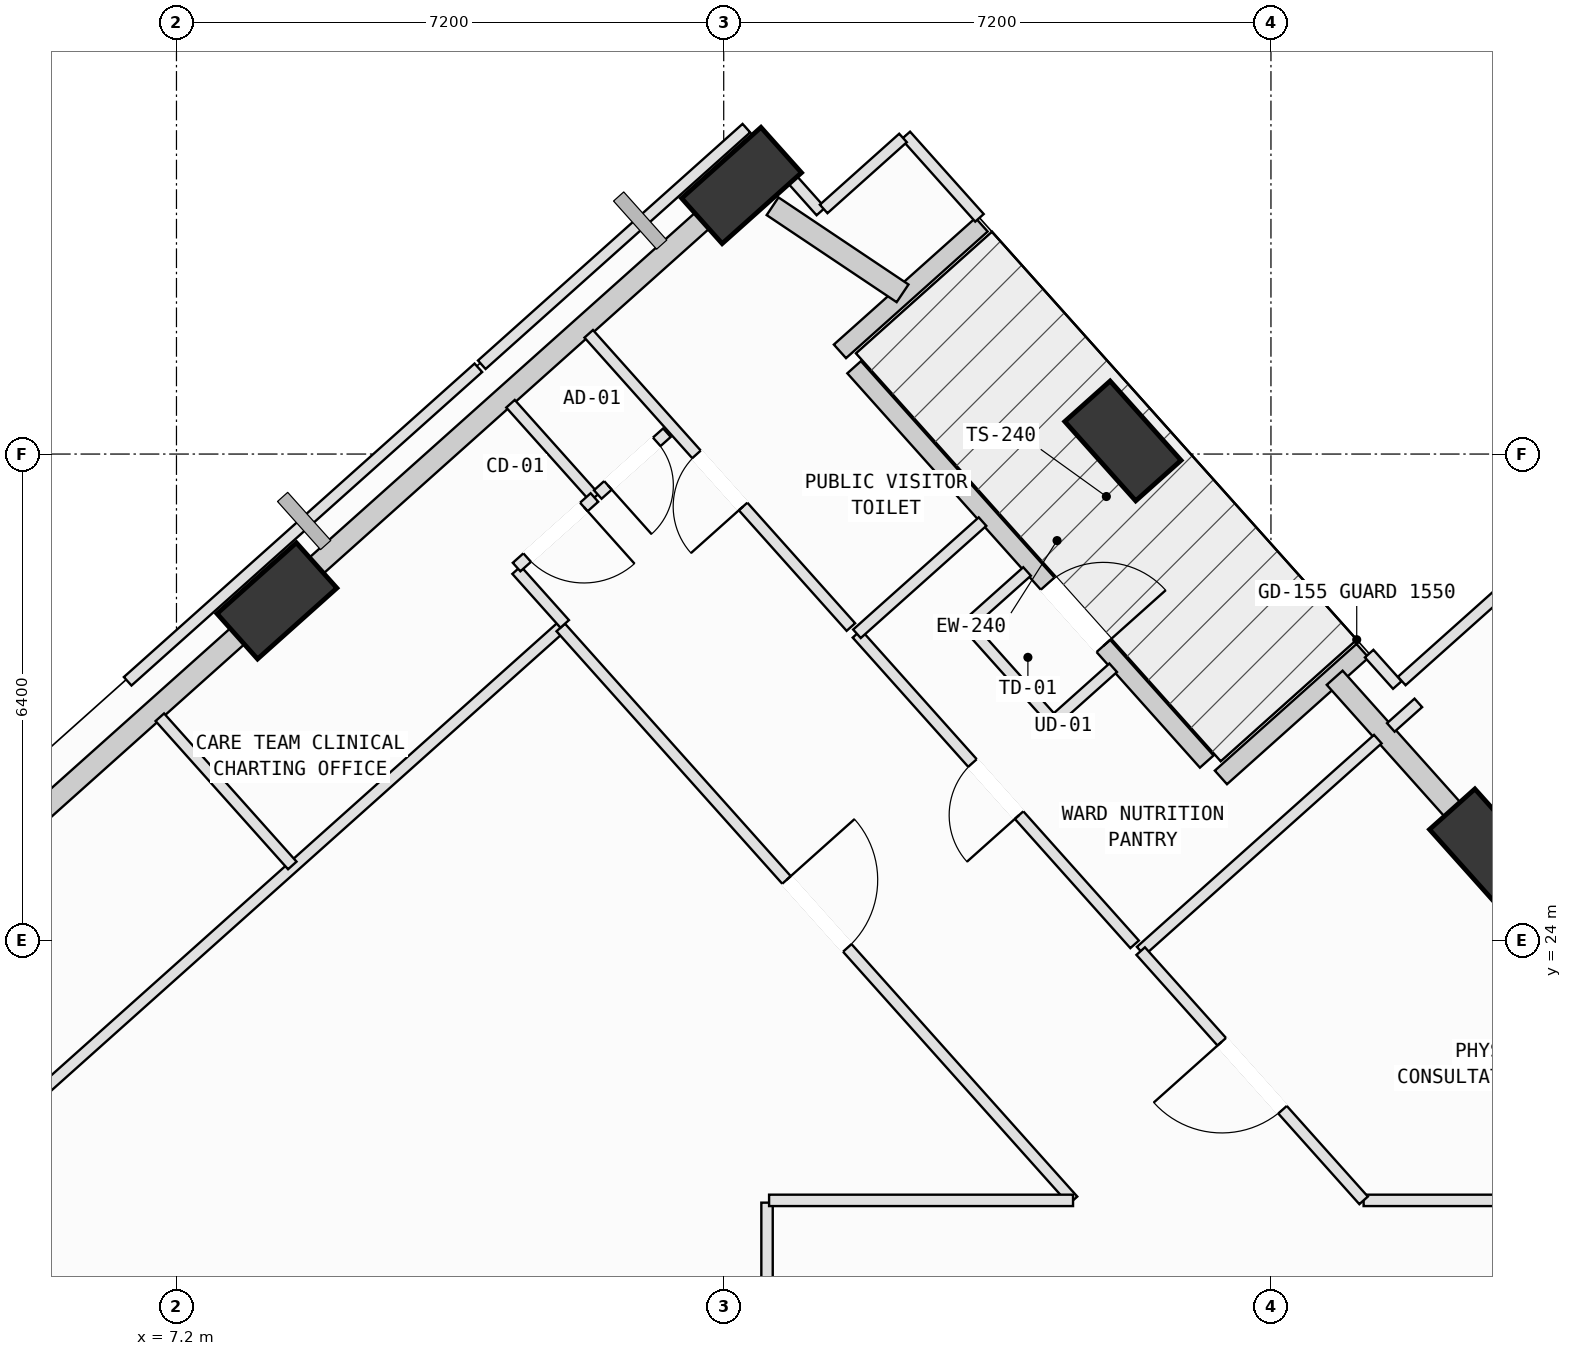
"""IFC4 building model, lengths in metres.
Left out: names, types, materials, properties, quantities, classifications, styles, units other than length and angle.
Written with IfcOpenShell. Run it as: python <this file> out.ifc"""

import sys

from ifc_helpers import new_model, si_unit, direction, frame, frame_2d, origin, origin_2d, place, context, subcontext, project, spatial, rectangle, extrude, element, fill, save


model = new_model("IFC4")
c1 = context("Model", 3, precision=1e-05, world=origin(), true_north=direction((0.0, 1.0)))
c2 = subcontext(c1, "Body", "Model", "MODEL_VIEW")
j1 = project(units=[si_unit("LENGTHUNIT", "METRE"), si_unit("PLANEANGLEUNIT", "RADIAN")], contexts=[c1])
p1 = place(None, origin())
s1 = spatial("IfcSite", under=j1, at=p1, CompositionType="ELEMENT")
p2 = place(p1, origin())
s2 = spatial("IfcBuilding", under=s1, at=p2, CompositionType="ELEMENT")
p3 = place(p2, frame((0.0, 0.0, 201.8)))
s3 = spatial("IfcBuildingStorey", under=s2, at=p3, CompositionType="ELEMENT", Elevation=201.8)
p4 = place(p3, frame((24.451, 25.205, 0.002), z_axis=(-0.001414889016, -0.037894418868, 0.999280746891), x_axis=(-0.63827340517, 0.769290530465, 0.028269064174)))
e1 = element("IfcColumn", 1, at=p4, inside=s3, PredefinedType="COLUMN", context=c2, shape_type="SweptSolid", body=[
    extrude(rectangle(XDim=1.4, YDim=0.8, at=origin_2d()), origin(), (0.0, 0.0, 1.0), 3.969),
])
p5 = place(p3, frame((19.652, 30.573, 0.002), z_axis=(-0.023400018173, -0.057851759968, 0.998050907027), x_axis=(-0.338913817556, 0.939666525529, 0.046521447421)))
e2 = element("IfcColumn", 2, at=p5, inside=s3, PredefinedType="COLUMN", context=c2, shape_type="SweptSolid", body=[
    extrude(rectangle(XDim=1.4, YDim=0.8, at=origin_2d()), origin(), (0.0, 0.0, 1.0), 3.954),
])
p6 = place(p3, frame((14.635, 33.934, 0.002), z_axis=(-0.037077983422, -0.078612752832, 0.996215467777), x_axis=(0.957500793087, 0.282552508139, 0.057933680899)))
e3 = element("IfcColumn", 3, at=p6, inside=s3, PredefinedType="COLUMN", context=c2, shape_type="SweptSolid", body=[
    extrude(rectangle(XDim=1.4, YDim=0.8, at=origin_2d()), origin(), (0.0, 0.0, 1.0), 3.944),
])
p7 = place(p3, frame((8.522, 28.468, 0.002), z_axis=(-0.014261490133, -0.103550819662, 0.994521914111), x_axis=(0.828946191978, 0.554972155566, 0.069671495975)))
e4 = element("IfcColumn", 4, at=p7, inside=s3, PredefinedType="COLUMN", context=c2, shape_type="SweptSolid", body=[
    extrude(rectangle(XDim=1.4, YDim=0.8, at=origin_2d()), origin(), (0.0, 0.0, 1.0), 3.937),
])
p8 = place(p3, frame((16.116, 31.542, 0.0), z_axis=(0.0, 0.0, 1.0), x_axis=(0.666505663581, -0.745499966743, 0.0)))
e5 = element("IfcWall", 5, at=p8, inside=s3, PredefinedType="SOLIDWALL", context=c2, shape_type="SweptSolid", body=[
    extrude(rectangle(XDim=6.96, YDim=0.24, at=frame_2d((3.48, 0.0))), origin(), (0.0, 0.0, 1.0), 3.185),
])
p9 = place(p8, frame((3.82, 0.0, 0.0)))
e6 = element("IfcOpeningElement", 6, at=p9, cuts=e5, PredefinedType="OPENING", context=c2, shape_type="SweptSolid", body=[
    extrude(rectangle(XDim=1.1, YDim=2.15, at=frame_2d((0.55, 1.075))), frame((0.0, 0.13, 0.0), z_axis=(0.0, -1.0, 0.0), x_axis=(1.0, 0.0, 0.0)), (0.0, 0.0, 1.0), 0.26),
])
for number, where, z_axis, x_axis in (
    (7, (20.942, 26.145, 0.0), (0.0, 0.0, 1.0), (0.746, 0.667, 0.0)),
    (8, (17.793, 33.417, 0.0), (0.0, 0.0, 1.0), (-0.746, -0.667, 0.0)),
):
    element("IfcWall", number, at=place(p3, frame(where, z_axis=z_axis, x_axis=x_axis)), inside=s3, PredefinedType="SOLIDWALL", context=c2, shape_type="SweptSolid", body=[
        extrude(rectangle(XDim=2.5, YDim=0.24, at=frame_2d((1.25, 0.0))), origin(), (0.0, 0.0, 1.0), 3.185),
    ])
p10 = place(p3, frame((24.159, 25.532, 0.0), z_axis=(0.0, 0.0, 1.0), x_axis=(-0.666515579079, 0.745491101788, 0.0)))
e9 = element("IfcWall", 9, at=p10, inside=s3, PredefinedType="SOLIDWALL", context=c2, shape_type="SweptSolid", body=[
    extrude(rectangle(XDim=2.581, YDim=0.28, at=frame_2d((1.291, 0.0))), origin(), (0.0, 0.0, 1.0), 3.185),
])
p11 = place(p3, frame((15.043, 33.66, 0.0), z_axis=(0.0, 0.0, 1.0), x_axis=(0.830825907851, -0.556532398736, 0.0)))
e10 = element("IfcWall", 10, at=p11, inside=s3, PredefinedType="SOLIDWALL", context=c2, shape_type="SweptSolid", body=[
    extrude(rectangle(XDim=2.059, YDim=0.28, at=frame_2d((1.029, 0.0))), origin(), (0.0, 0.0, 1.0), 3.185),
])
p12 = place(p3, frame((8.758, 28.68, 0.0), z_axis=(0.0, 0.0, 1.0), x_axis=(0.745474395111, 0.666534264862, 0.0)))
e11 = element("IfcWall", 11, at=p12, inside=s3, PredefinedType="SOLIDWALL", context=c2, shape_type="SweptSolid", body=[
    extrude(rectangle(XDim=7.231, YDim=0.28, at=frame_2d((3.615, 0.0))), origin(), (0.0, 0.0, 1.0), 3.185),
])
p13 = place(p3, frame((2.627, 23.198, 0.0), z_axis=(0.0, 0.0, 1.0), x_axis=(0.745479282524, 0.666528798573, 0.0)))
e12 = element("IfcWall", 12, at=p13, inside=s3, PredefinedType="SOLIDWALL", context=c2, shape_type="SweptSolid", body=[
    extrude(rectangle(XDim=7.27, YDim=0.28, at=frame_2d((3.635, 0.0))), origin(), (0.0, 0.0, 1.0), 3.185),
])
p14 = place(p3, frame((14.97, 20.55, 0.0), z_axis=(0.0, 0.0, 1.0), x_axis=(0.0, -1.0, 0.0)))
e13 = element("IfcWall", 13, at=p14, inside=s3, PredefinedType="PARTITIONING", context=c2, shape_type="SweptSolid", body=[
    extrude(rectangle(XDim=2.32, YDim=0.15, at=frame_2d((1.16, 0.0))), origin(), (0.0, 0.0, 1.0), 3.7),
])
p15 = place(p3, frame((2.9, 19.753, 0.0), z_axis=(0.0, 0.0, 1.0), x_axis=(0.745492591752, 0.666513912565, 0.0)))
e14 = element("IfcWall", 14, at=p15, inside=s3, PredefinedType="PARTITIONING", context=c2, shape_type="SweptSolid", body=[
    extrude(rectangle(XDim=12.55, YDim=0.15, at=frame_2d((6.275, 0.0))), origin(), (0.0, 0.0, 1.0), 3.7),
])
p16 = place(p3, frame((12.256, 28.118, 0.0), z_axis=(0.0, 0.0, 1.0), x_axis=(0.666553455148, -0.745457236487, 0.0)))
e15 = element("IfcWall", 15, at=p16, inside=s3, PredefinedType="PARTITIONING", context=c2, shape_type="SweptSolid", body=[
    extrude(rectangle(XDim=10.112, YDim=0.15, at=frame_2d((5.056, 0.0))), origin(), (0.0, 0.0, 1.0), 3.7),
])
p17 = place(p16, frame((4.456, 0.0, 0.0)))
e16 = element("IfcOpeningElement", 16, at=p17, cuts=e15, PredefinedType="OPENING", context=c2, shape_type="SweptSolid", body=[
    extrude(rectangle(XDim=1.2, YDim=2.15, at=frame_2d((0.6, 1.075))), frame((0.0, 0.085, 0.0), z_axis=(0.0, -1.0, 0.0), x_axis=(1.0, 0.0, 0.0)), (0.0, 0.0, 1.0), 0.17),
])
p18 = place(p3, frame((18.996, 20.58, 0.0), z_axis=(0.0, 0.0, 1.0), x_axis=(-1.0, 0.0, 0.0)))
e17 = element("IfcWall", 17, at=p18, inside=s3, PredefinedType="PARTITIONING", context=c2, shape_type="SweptSolid", body=[
    extrude(rectangle(XDim=3.999, YDim=0.15, at=frame_2d((2.0, 0.0))), origin(), (0.0, 0.0, 1.0), 3.7),
])
p19 = place(p3, frame((19.886, 23.86, 0.0), z_axis=(0.0, 0.0, 1.0), x_axis=(0.745581471628, 0.666414487512, 0.0)))
e18 = element("IfcWall", 18, at=p19, inside=s3, PredefinedType="PARTITIONING", context=c2, shape_type="SweptSolid", body=[
    extrude(rectangle(XDim=4.185, YDim=0.15, at=frame_2d((2.092, 0.0))), origin(), (0.0, 0.0, 1.0), 3.7),
])
p20 = place(p3, frame((23.177, 26.803, 0.0), z_axis=(0.0, 0.0, 1.0), x_axis=(0.746214363491, 0.665705733579, 0.0)))
e19 = element("IfcWall", 19, at=p20, inside=s3, PredefinedType="PARTITIONING", context=c2, shape_type="SweptSolid", body=[
    extrude(rectangle(XDim=0.485, YDim=0.15, at=frame_2d((0.243, 0.0))), origin(), (0.0, 0.0, 1.0), 3.7),
])
p21 = place(p3, frame((25.49, 20.58, 0.0), z_axis=(0.0, 0.0, 1.0), x_axis=(-1.0, 0.0, 0.0)))
e20 = element("IfcWall", 20, at=p21, inside=s3, PredefinedType="PARTITIONING", context=c2, shape_type="SweptSolid", body=[
    extrude(rectangle(XDim=2.671, YDim=0.15, at=frame_2d((1.335, 0.0))), origin(), (0.0, 0.0, 1.0), 3.7),
])
p22 = place(p3, frame((22.819, 20.58, 0.0), z_axis=(0.0, 0.0, 1.0), x_axis=(-0.66658561557, 0.745428478873, 0.0)))
e21 = element("IfcWall", 21, at=p22, inside=s3, PredefinedType="PARTITIONING", context=c2, shape_type="SweptSolid", body=[
    extrude(rectangle(XDim=4.4, YDim=0.15, at=frame_2d((2.2, 0.0))), origin(), (0.0, 0.0, 1.0), 3.7),
])
p23 = place(p22, frame((1.6, 0.0, 0.0)))
e22 = element("IfcOpeningElement", 22, at=p23, cuts=e21, PredefinedType="OPENING", context=c2, shape_type="SweptSolid", body=[
    extrude(rectangle(XDim=1.2, YDim=2.15, at=frame_2d((0.6, 1.075))), frame((0.0, 0.085, 0.0), z_axis=(0.0, -1.0, 0.0), x_axis=(1.0, 0.0, 0.0)), (0.0, 0.0, 1.0), 0.17),
])
p24 = place(p3, frame((19.806, 23.949, 0.0), z_axis=(0.0, 0.0, 1.0), x_axis=(-0.666490112364, 0.745513869838, 0.0)))
e23 = element("IfcWall", 23, at=p24, inside=s3, PredefinedType="PARTITIONING", context=c2, shape_type="SweptSolid", body=[
    extrude(rectangle(XDim=5.481, YDim=0.15, at=frame_2d((2.74, 0.0))), origin(), (0.0, 0.0, 1.0), 3.7),
])
p25 = place(p24, frame((2.281, 0.0, 0.0)))
e24 = element("IfcOpeningElement", 24, at=p25, cuts=e23, PredefinedType="OPENING", context=c2, shape_type="SweptSolid", body=[
    extrude(rectangle(XDim=0.92, YDim=2.1, at=frame_2d((0.46, 1.05))), frame((0.0, 0.085, 0.0), z_axis=(0.0, -1.0, 0.0), x_axis=(1.0, 0.0, 0.0)), (0.0, 0.0, 1.0), 0.17),
])
p26 = place(p3, frame((16.153, 28.035, 0.0), z_axis=(0.0, 0.0, 1.0), x_axis=(0.745667750991, 0.666317945978, 0.0)))
e25 = element("IfcWall", 25, at=p26, inside=s3, PredefinedType="PARTITIONING", context=c2, shape_type="SweptSolid", body=[
    extrude(rectangle(XDim=2.215, YDim=0.15, at=frame_2d((1.108, 0.0))), origin(), (0.0, 0.0, 1.0), 3.7),
])
p27 = place(p3, frame((18.391, 28.855, 0.0), z_axis=(0.0, 0.0, 1.0), x_axis=(-0.74588840019, -0.666070938011, 0.0)))
e26 = element("IfcWall", 26, at=p27, inside=s3, PredefinedType="PARTITIONING", context=c2, shape_type="SweptSolid", body=[
    extrude(rectangle(XDim=1.055, YDim=0.15, at=frame_2d((0.528, 0.0))), origin(), (0.0, 0.0, 1.0), 3.7),
])
p28 = place(p3, frame((17.604, 28.152, 0.0), z_axis=(0.0, 0.0, 1.0), x_axis=(0.666899772094, -0.745147431037, 0.0)))
e27 = element("IfcWall", 27, at=p28, inside=s3, PredefinedType="PARTITIONING", context=c2, shape_type="SweptSolid", body=[
    extrude(rectangle(XDim=1.7, YDim=0.15, at=frame_2d((0.85, 0.0))), origin(), (0.0, 0.0, 1.0), 3.7),
])
p29 = place(p3, frame((18.738, 26.885, 0.0), z_axis=(0.0, 0.0, 1.0), x_axis=(0.745374531652, 0.666645938685, 0.0)))
e28 = element("IfcWall", 28, at=p29, inside=s3, PredefinedType="PARTITIONING", context=c2, shape_type="SweptSolid", body=[
    extrude(rectangle(XDim=1.054, YDim=0.15, at=frame_2d((0.527, 0.0))), origin(), (0.0, 0.0, 1.0), 3.7),
])
p30 = place(p3, frame((22.892, 27.774, 0.0), z_axis=(0.0, 0.0, 1.0), x_axis=(0.667283955709, -0.74480341195, 0.0)))
e29 = element("IfcWall", 29, at=p30, inside=s3, PredefinedType="PARTITIONING", context=c2, shape_type="SweptSolid", body=[
    extrude(rectangle(XDim=0.554, YDim=0.15, at=frame_2d((0.277, 0.0))), origin(), (0.0, 0.0, 1.0), 3.7),
])
p31 = place(p3, frame((16.796, 34.592, 0.0), z_axis=(0.0, 0.0, 1.0), x_axis=(0.666456118224, -0.745544259238, 0.0)))
e30 = element("IfcWall", 30, at=p31, inside=s3, PredefinedType="PARTITIONING", context=c2, shape_type="SweptSolid", body=[
    extrude(rectangle(XDim=1.454, YDim=0.15, at=frame_2d((0.727, 0.0))), origin(), (0.0, 0.0, 1.0), 3.7),
])
p32 = place(p3, frame((16.073, 28.124, 0.0), z_axis=(0.0, 0.0, 1.0), x_axis=(-0.666490030892, 0.745513942674, 0.0)))
e31 = element("IfcWall", 31, at=p32, inside=s3, PredefinedType="PARTITIONING", context=c2, shape_type="SweptSolid", body=[
    extrude(rectangle(XDim=5.175, YDim=0.15, at=frame_2d((2.587, 0.0))), origin(), (0.0, 0.0, 1.0), 3.7),
])
p33 = place(p32, frame((2.127, 0.0, 0.0)))
e32 = element("IfcOpeningElement", 32, at=p33, cuts=e31, PredefinedType="OPENING", context=c2, shape_type="SweptSolid", body=[
    extrude(rectangle(XDim=0.92, YDim=2.1, at=frame_2d((0.46, 1.05))), frame((0.0, 0.085, 0.0), z_axis=(0.0, -1.0, 0.0), x_axis=(1.0, 0.0, 0.0)), (0.0, 0.0, 1.0), 0.17),
])
p34 = place(p3, frame((14.022, 33.641, 0.0), z_axis=(0.0, 0.0, 1.0), x_axis=(0.745613144613, 0.666379050226, 0.0)))
e33 = element("IfcWall", 33, at=p34, inside=s3, PredefinedType="PARTITIONING", context=c2, shape_type="SweptSolid", body=[
    extrude(rectangle(XDim=1.202, YDim=0.15, at=frame_2d((0.601, 0.0))), origin(), (0.0, 0.0, 1.0), 3.185),
])
p35 = place(p3, frame((14.951, 34.405, 0.0), z_axis=(0.0, 0.0, 1.0), x_axis=(0.666611630462, -0.745405214721, 0.0)))
e34 = element("IfcWall", 34, at=p35, inside=s3, PredefinedType="PARTITIONING", context=c2, shape_type="SweptSolid", body=[
    extrude(rectangle(XDim=1.091, YDim=0.15, at=frame_2d((0.545, 0.0))), origin(), (0.0, 0.0, 1.0), 3.7),
])
p36 = place(p3, frame((15.715, 33.625, 0.0), z_axis=(0.0, 0.0, 1.0), x_axis=(0.745232197137, 0.666805048234, 0.0)))
e35 = element("IfcWall", 35, at=p36, inside=s3, PredefinedType="PARTITIONING", context=c2, shape_type="SweptSolid", body=[
    extrude(rectangle(XDim=1.401, YDim=0.15, at=frame_2d((0.7, 0.0))), origin(), (0.0, 0.0, 1.0), 3.7),
])
p37 = place(p3, frame((11.675, 28.873, 0.0), z_axis=(0.0, 0.0, 1.0), x_axis=(0.666546862145, -0.745463131593, 0.0)))
e36 = element("IfcWall", 36, at=p37, inside=s3, PredefinedType="PARTITIONING", context=c2, shape_type="SweptSolid", body=[
    extrude(rectangle(XDim=0.95, YDim=0.15, at=frame_2d((0.475, 0.0))), origin(), (0.0, 0.0, 1.0), 3.7),
])
p38 = place(p3, frame((8.724, 24.987, 0.0), z_axis=(0.0, 0.0, 1.0), x_axis=(-0.66647010562, 0.745531755404, 0.0)))
e37 = element("IfcWall", 37, at=p38, inside=s3, PredefinedType="PARTITIONING", context=c2, shape_type="SweptSolid", body=[
    extrude(rectangle(XDim=2.615, YDim=0.15, at=frame_2d((1.308, 0.0))), origin(), (0.0, 0.0, 1.0), 3.7),
])
p39 = place(p3, frame((6.558, 27.41, 0.0), z_axis=(0.0, 0.0, 1.0), x_axis=(0.745508461456, 0.666496161953, 0.0)))
e38 = element("IfcWall", 38, at=p39, inside=s3, PredefinedType="PARTITIONING", context=c2, shape_type="SweptSolid", body=[
    extrude(rectangle(XDim=6.189, YDim=0.15, at=frame_2d((3.094, 0.0))), origin(), (0.0, 0.0, 1.0), 3.7),
])
p40 = place(p3, frame((11.595, 31.062, 0.0), z_axis=(0.0, 0.0, 1.0), x_axis=(0.666721590139, -0.74530686381, 0.0)))
e39 = element("IfcWall", 39, at=p40, inside=s3, PredefinedType="PARTITIONING", context=c2, shape_type="SweptSolid", body=[
    extrude(rectangle(XDim=1.656, YDim=0.15, at=frame_2d((0.828, 0.0))), origin(), (0.0, 0.0, 1.0), 3.7),
])
p41 = place(p3, frame((12.699, 29.828, 0.0), z_axis=(0.0, 0.0, 1.0), x_axis=(-0.745729403565, -0.666248944959, 0.0)))
e40 = element("IfcWall", 40, at=p41, inside=s3, PredefinedType="PARTITIONING", context=c2, shape_type="SweptSolid", body=[
    extrude(rectangle(XDim=1.373, YDim=0.15, at=frame_2d((0.687, 0.0))), origin(), (0.0, 0.0, 1.0), 3.7),
])
p42 = place(p41, frame((0.187, 0.0, 0.0)))
e41 = element("IfcOpeningElement", 41, at=p42, cuts=e40, PredefinedType="OPENING", context=c2, shape_type="SweptSolid", body=[
    extrude(rectangle(XDim=1.0, YDim=2.12, at=frame_2d((0.5, 1.06))), frame((0.0, 0.085, 0.0), z_axis=(0.0, -1.0, 0.0), x_axis=(1.0, 0.0, 0.0)), (0.0, 0.0, 1.0), 0.17),
])
p43 = place(p3, frame((13.653, 30.681, 0.0), z_axis=(0.0, 0.0, 1.0), x_axis=(-0.745795662785, -0.666174773893, 0.0)))
e42 = element("IfcWall", 42, at=p43, inside=s3, PredefinedType="PARTITIONING", context=c2, shape_type="SweptSolid", body=[
    extrude(rectangle(XDim=1.22, YDim=0.15, at=frame_2d((0.61, 0.0))), origin(), (0.0, 0.0, 1.0), 3.7),
])
p44 = place(p43, frame((0.18, 0.0, 0.0)))
e43 = element("IfcOpeningElement", 43, at=p44, cuts=e42, PredefinedType="OPENING", context=c2, shape_type="SweptSolid", body=[
    extrude(rectangle(XDim=0.86, YDim=2.06, at=frame_2d((0.43, 1.03))), frame((0.0, 0.085, 0.0), z_axis=(0.0, -1.0, 0.0), x_axis=(1.0, 0.0, 0.0)), (0.0, 0.0, 1.0), 0.17),
])
p45 = place(p3, frame((11.217, 31.575, 0.0), z_axis=(0.0, 0.0, 1.0), x_axis=(0.745401267381, 0.666616044352, 0.0)))
e44 = element("IfcWall", 44, at=p45, inside=s3, PredefinedType="PARTITIONING", context=c2, shape_type="SweptSolid", body=[
    extrude(rectangle(XDim=4.67, YDim=0.15, at=frame_2d((2.335, 0.0))), origin(), (0.0, 0.0, 1.0), 3.7),
])
p46 = place(p3, frame((23.321, 27.414, 0.0), z_axis=(0.0, 0.0, 1.0), x_axis=(0.745659752228, 0.666326897181, 0.0)))
e45 = element("IfcWall", 45, at=p46, inside=s3, PredefinedType="PARTITIONING", context=c2, shape_type="SweptSolid", body=[
    extrude(rectangle(XDim=2.12, YDim=0.15, at=frame_2d((1.06, 0.0))), origin(), (0.0, 0.0, 1.0), 3.7),
])
p47 = place(p9, origin())
e46 = element("IfcDoor", 46, at=p47, inside=s3, OperationType="SINGLE_SWING_RIGHT", PredefinedType="DOOR", context=c2, shape_type="SweptSolid", body=[
    extrude(rectangle(XDim=1.1, YDim=2.15, at=frame_2d((0.55, 1.075))), frame((0.0, 0.025, 0.0), z_axis=(0.0, -1.0, 0.0), x_axis=(1.0, 0.0, 0.0)), (0.0, 0.0, 1.0), 0.05),
])
fill(e6, e46)
p48 = place(p17, origin())
e47 = element("IfcDoor", 47, at=p48, inside=s3, OperationType="SINGLE_SWING_LEFT", PredefinedType="DOOR", context=c2, shape_type="SweptSolid", body=[
    extrude(rectangle(XDim=1.2, YDim=2.15, at=frame_2d((0.6, 1.075))), frame((0.0, 0.025, 0.0), z_axis=(0.0, -1.0, 0.0), x_axis=(1.0, 0.0, 0.0)), (0.0, 0.0, 1.0), 0.05),
])
fill(e16, e47)
p49 = place(p23, origin())
e48 = element("IfcDoor", 48, at=p49, inside=s3, OperationType="SINGLE_SWING_RIGHT", PredefinedType="DOOR", context=c2, shape_type="SweptSolid", body=[
    extrude(rectangle(XDim=1.2, YDim=2.15, at=frame_2d((0.6, 1.075))), frame((0.0, 0.025, 0.0), z_axis=(0.0, -1.0, 0.0), x_axis=(1.0, 0.0, 0.0)), (0.0, 0.0, 1.0), 0.05),
])
fill(e22, e48)
p50 = place(p25, origin())
e49 = element("IfcDoor", 49, at=p50, inside=s3, OperationType="SINGLE_SWING_LEFT", PredefinedType="DOOR", context=c2, shape_type="SweptSolid", body=[
    extrude(rectangle(XDim=0.92, YDim=2.1, at=frame_2d((0.46, 1.05))), frame((0.0, 0.025, 0.0), z_axis=(0.0, -1.0, 0.0), x_axis=(1.0, 0.0, 0.0)), (0.0, 0.0, 1.0), 0.05),
])
fill(e24, e49)
p51 = place(p33, origin())
e50 = element("IfcDoor", 50, at=p51, inside=s3, OperationType="SINGLE_SWING_LEFT", PredefinedType="DOOR", context=c2, shape_type="SweptSolid", body=[
    extrude(rectangle(XDim=0.92, YDim=2.1, at=frame_2d((0.46, 1.05))), frame((0.0, 0.025, 0.0), z_axis=(0.0, -1.0, 0.0), x_axis=(1.0, 0.0, 0.0)), (0.0, 0.0, 1.0), 0.05),
])
fill(e32, e50)
p52 = place(p42, origin())
e51 = element("IfcDoor", 51, at=p52, inside=s3, OperationType="SINGLE_SWING_LEFT", PredefinedType="DOOR", context=c2, shape_type="SweptSolid", body=[
    extrude(rectangle(XDim=1.0, YDim=2.12, at=frame_2d((0.5, 1.06))), frame((0.0, 0.025, 0.0), z_axis=(0.0, -1.0, 0.0), x_axis=(1.0, 0.0, 0.0)), (0.0, 0.0, 1.0), 0.05),
])
fill(e41, e51)
p53 = place(p44, origin())
e52 = element("IfcDoor", 52, at=p53, inside=s3, OperationType="SINGLE_SWING_RIGHT", PredefinedType="DOOR", context=c2, shape_type="SweptSolid", body=[
    extrude(rectangle(XDim=0.86, YDim=2.06, at=frame_2d((0.43, 1.03))), frame((0.0, 0.025, 0.0), z_axis=(0.0, -1.0, 0.0), x_axis=(1.0, 0.0, 0.0)), (0.0, 0.0, 1.0), 0.05),
])
fill(e43, e52)
save(model, sys.argv[1])
